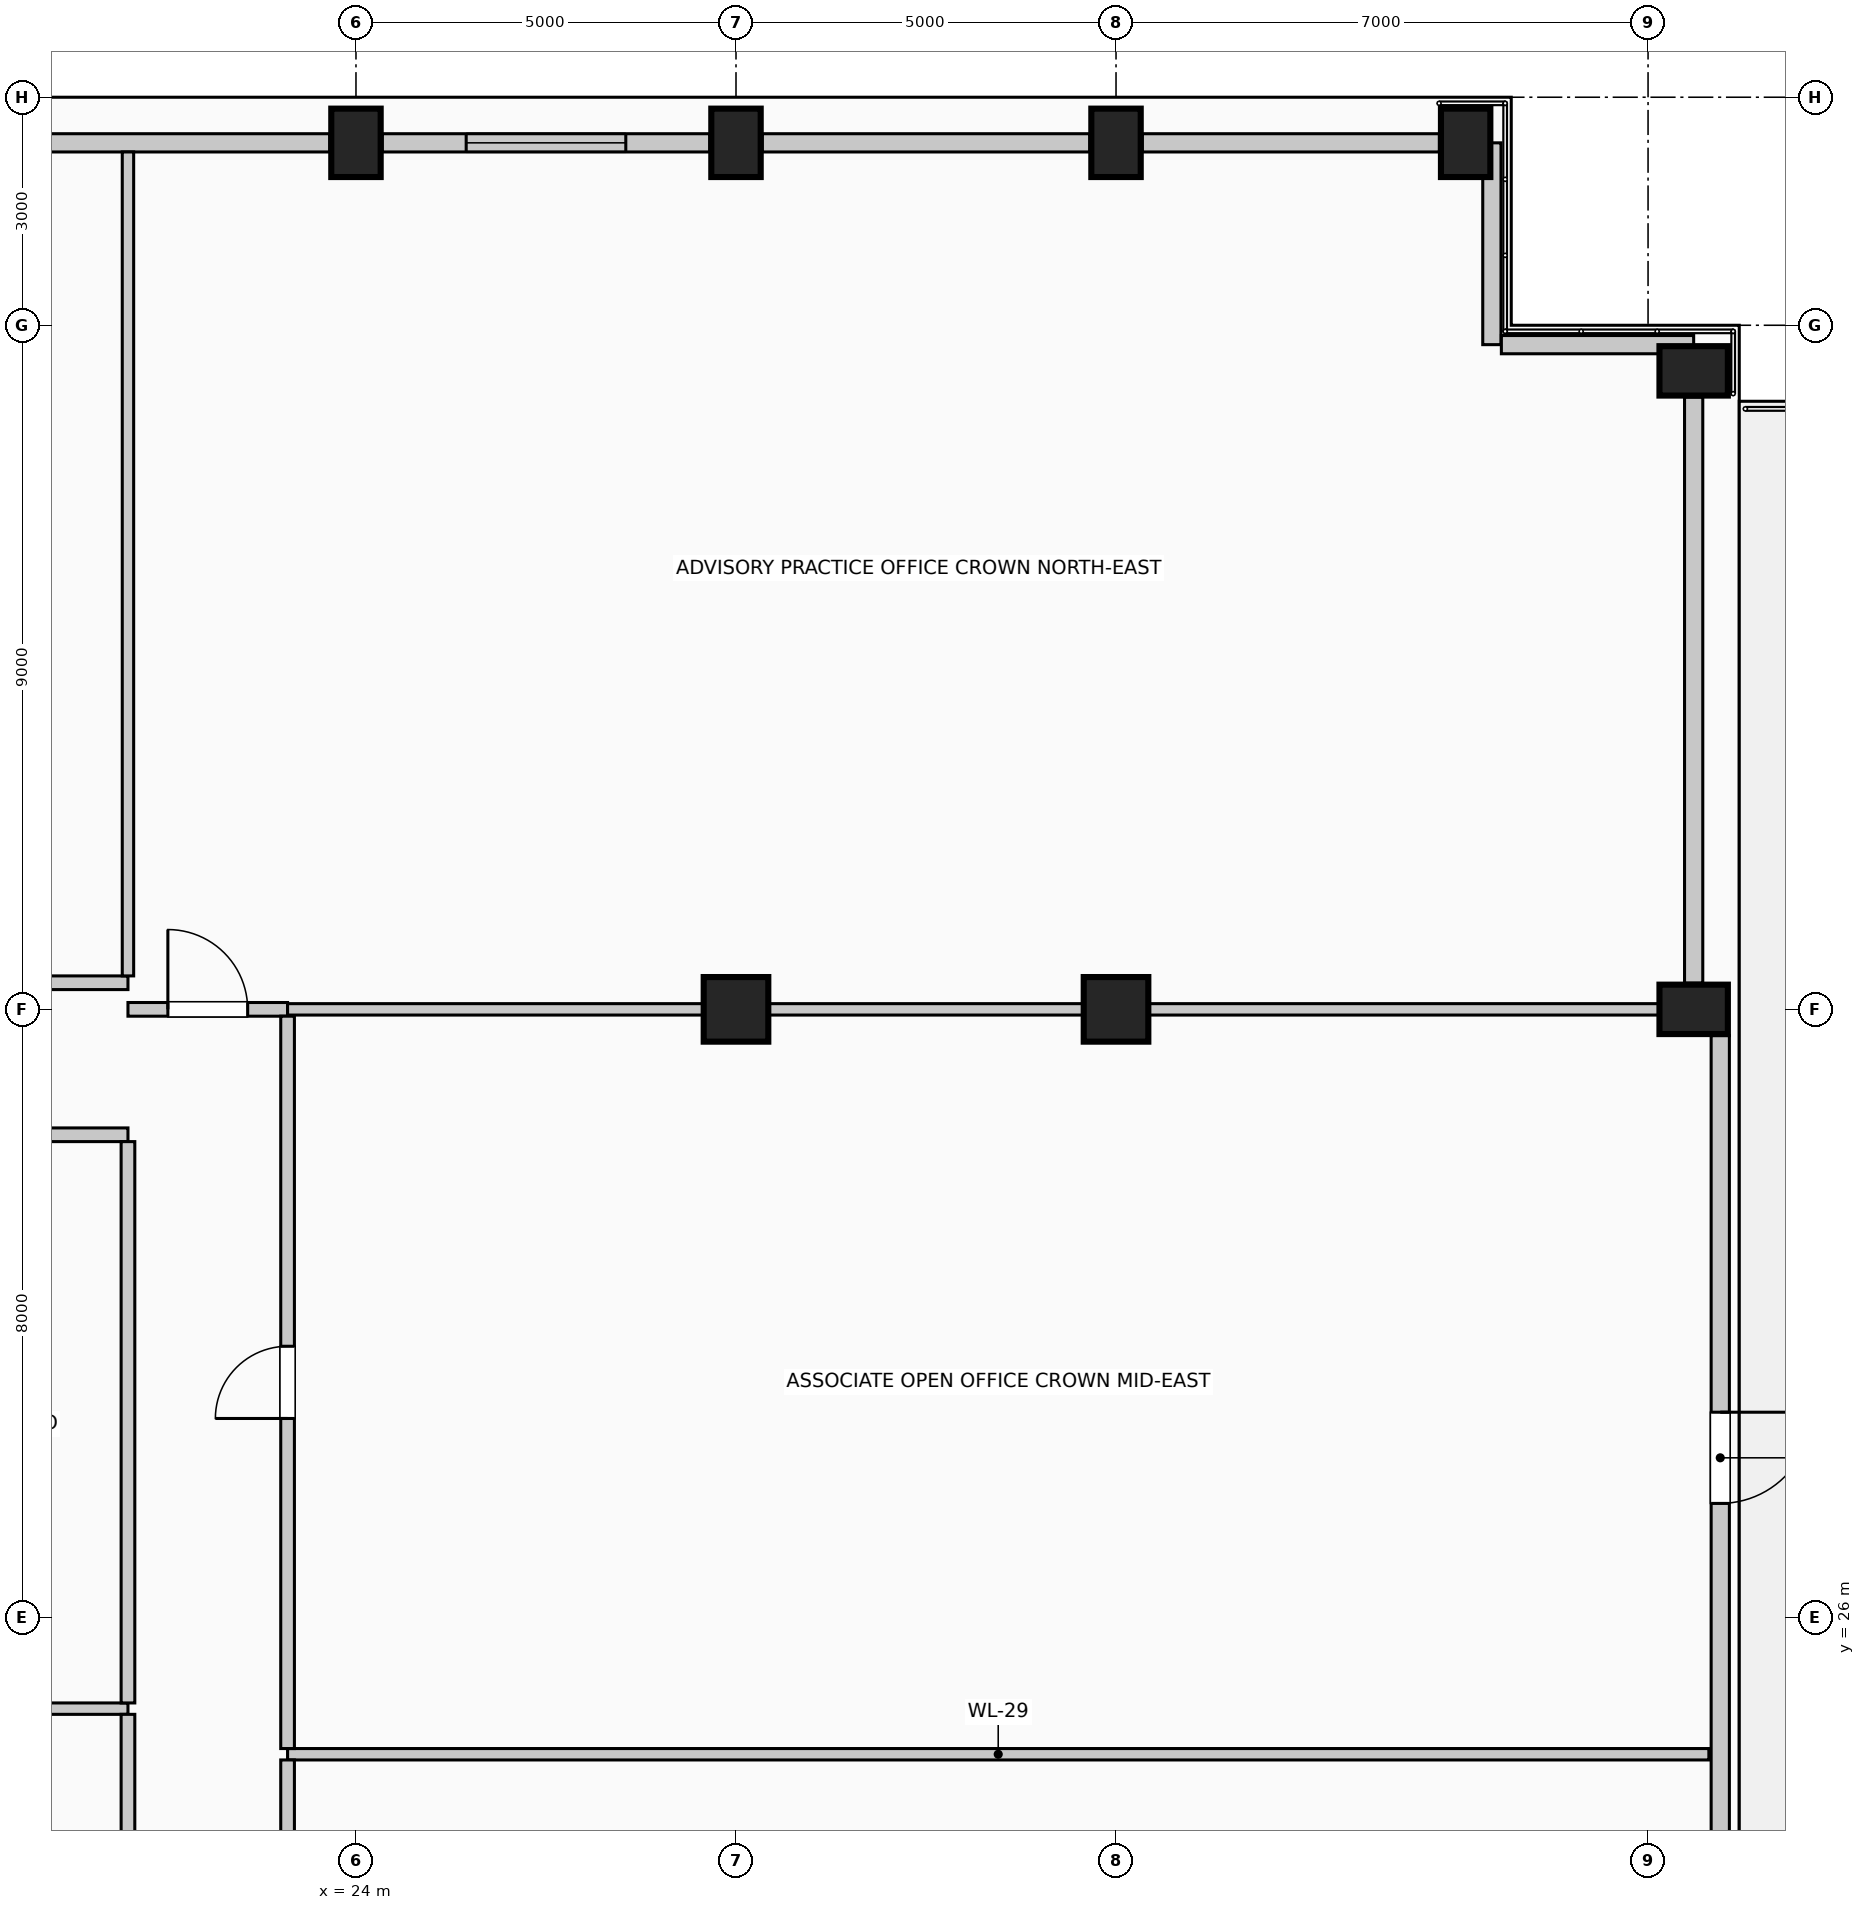
"""IFC4 building model, lengths in metres.
Left out: names, types, materials, properties, quantities, classifications, styles, units other than length and angle.
Written with IfcOpenShell. Run it as: python <this file> out.ifc"""

import sys

from ifc_helpers import new_model, si_unit, direction, frame, frame_2d, origin, origin_2d, place, context, subcontext, project, spatial, rectangle, circle, extrude, element, fill, save


model = new_model("IFC4")
c1 = context("Model", 3, precision=1e-05, world=origin(), true_north=direction((0.0, 1.0)))
c2 = subcontext(c1, "Body", "Model", "MODEL_VIEW")
j1 = project(units=[si_unit("LENGTHUNIT", "METRE"), si_unit("PLANEANGLEUNIT", "RADIAN")], contexts=[c1])
p1 = place(None, origin())
s1 = spatial("IfcSite", under=j1, at=p1, CompositionType="ELEMENT")
p2 = place(p1, origin())
s2 = spatial("IfcBuilding", under=s1, at=p2, CompositionType="ELEMENT")
p3 = place(p2, frame((0.0, 0.0, 297.0)))
s3 = spatial("IfcBuildingStorey", under=s2, at=p3, CompositionType="ELEMENT", Elevation=297.0)
for number, where, z_axis, x_axis in (
    (1, (24.0, 45.4, 0.0), (0.0, 0.0, 1.0), (1.0, 0.0, 0.0)),
    (2, (29.0, 45.4, 0.0), (0.0, 0.0, 1.0), (1.0, 0.0, 0.0)),
    (3, (34.0, 45.4, 0.0), (0.0, 0.0, 1.0), (1.0, 0.0, 0.0)),
    (4, (38.6, 45.4, 0.0), (0.0, 0.0, 1.0), (1.0, 0.0, 0.0)),
    (5, (41.6, 34.0, 0.0), (0.0, 0.0, 1.0), (0.0, 1.0, 0.0)),
    (6, (41.6, 42.4, 0.0), (0.0, 0.0, 1.0), (0.0, 1.0, 0.0)),
):
    element("IfcColumn", number, at=place(p3, frame(where, z_axis=z_axis, x_axis=x_axis)), inside=s3, PredefinedType="COLUMN", context=c2, shape_type="SweptSolid", body=[
        extrude(rectangle(XDim=0.65, YDim=0.9, at=origin_2d()), origin(), (0.0, 0.0, 1.0), 4.0),
    ])
for number, where, z_axis, x_axis in (
    (7, (29.0, 34.0, 0.0), (0.0, 0.0, 1.0), (1.0, 0.0, 0.0)),
    (8, (34.0, 34.0, 0.0), (0.0, 0.0, 1.0), (1.0, 0.0, 0.0)),
):
    element("IfcColumn", number, at=place(p3, frame(where, z_axis=z_axis, x_axis=x_axis)), inside=s3, PredefinedType="COLUMN", context=c2, shape_type="SweptSolid", body=[
        extrude(circle(Radius=0.425, at=origin_2d()), origin(), (0.0, 0.0, 1.0), 4.0),
    ])
p4 = place(p3, frame((16.745, 45.4, 0.0), z_axis=(0.0, 0.0, 1.0), x_axis=(1.0, 0.0, 0.0)))
e9 = element("IfcWall", 9, at=p4, inside=s3, PredefinedType="SOLIDWALL", context=c2, shape_type="SweptSolid", body=[
    extrude(rectangle(XDim=6.91, YDim=0.24, at=frame_2d((3.455, 0.0))), origin(), (0.0, 0.0, 1.0), 3.025),
])
p5 = place(p4, frame((0.903, 0.0, 0.35)))
e10 = element("IfcOpeningElement", 10, at=p5, cuts=e9, PredefinedType="OPENING", context=c2, shape_type="SweptSolid", body=[
    extrude(rectangle(XDim=2.1, YDim=2.2, at=frame_2d((1.05, 1.1))), frame((0.0, 0.13, 0.0), z_axis=(0.0, -1.0, 0.0), x_axis=(1.0, 0.0, 0.0)), (0.0, 0.0, 1.0), 0.26),
])
p6 = place(p3, frame((24.345, 45.4, 0.0), z_axis=(0.0, 0.0, 1.0), x_axis=(1.0, 0.0, 0.0)))
e11 = element("IfcWall", 11, at=p6, inside=s3, PredefinedType="SOLIDWALL", context=c2, shape_type="SweptSolid", body=[
    extrude(rectangle(XDim=4.31, YDim=0.24, at=frame_2d((2.155, 0.0))), origin(), (0.0, 0.0, 1.0), 3.025),
])
p7 = place(p6, frame((1.105, 0.0, 0.35)))
e12 = element("IfcOpeningElement", 12, at=p7, cuts=e11, PredefinedType="OPENING", context=c2, shape_type="SweptSolid", body=[
    extrude(rectangle(XDim=2.1, YDim=2.2, at=frame_2d((1.05, 1.1))), frame((0.0, 0.13, 0.0), z_axis=(0.0, -1.0, 0.0), x_axis=(1.0, 0.0, 0.0)), (0.0, 0.0, 1.0), 0.26),
])
p8 = place(p3, frame((29.345, 45.4, 0.0), z_axis=(0.0, 0.0, 1.0), x_axis=(1.0, 0.0, 0.0)))
e13 = element("IfcWall", 13, at=p8, inside=s3, PredefinedType="SOLIDWALL", context=c2, shape_type="SweptSolid", body=[
    extrude(rectangle(XDim=4.31, YDim=0.24, at=frame_2d((2.155, 0.0))), origin(), (0.0, 0.0, 1.0), 3.025),
])
p9 = place(p3, frame((34.345, 45.4, 0.0), z_axis=(0.0, 0.0, 1.0), x_axis=(1.0, 0.0, 0.0)))
e14 = element("IfcWall", 14, at=p9, inside=s3, PredefinedType="SOLIDWALL", context=c2, shape_type="SweptSolid", body=[
    extrude(rectangle(XDim=3.91, YDim=0.24, at=frame_2d((1.955, 0.0))), origin(), (0.0, 0.0, 1.0), 3.025),
])
p10 = place(p3, frame((41.95, 33.655, 0.0), z_axis=(0.0, 0.0, 1.0), x_axis=(0.0, -1.0, 0.0)))
e15 = element("IfcWall", 15, at=p10, inside=s3, PredefinedType="SOLIDWALL", context=c2, shape_type="SweptSolid", body=[
    extrude(rectangle(XDim=15.31, YDim=0.24, at=frame_2d((7.655, 0.0))), origin(), (0.0, 0.0, 1.0), 3.775),
])
p11 = place(p10, frame((4.955, 0.0, 0.0)))
e16 = element("IfcOpeningElement", 16, at=p11, cuts=e15, PredefinedType="OPENING", context=c2, shape_type="SweptSolid", body=[
    extrude(rectangle(XDim=1.2, YDim=2.25, at=frame_2d((0.6, 1.125))), frame((0.0, 0.13, 0.0), z_axis=(0.0, -1.0, 0.0), x_axis=(1.0, 0.0, 0.0)), (0.0, 0.0, 1.0), 0.26),
])
p12 = place(p3, frame((41.6, 42.055, 0.0), z_axis=(0.0, 0.0, 1.0), x_axis=(0.0, -1.0, 0.0)))
e17 = element("IfcWall", 17, at=p12, inside=s3, PredefinedType="SOLIDWALL", context=c2, shape_type="SweptSolid", body=[
    extrude(rectangle(XDim=7.71, YDim=0.24, at=frame_2d((3.855, 0.0))), origin(), (0.0, 0.0, 1.0), 3.025),
])
p13 = place(p3, frame((38.945, 45.4, 0.0), z_axis=(0.0, 0.0, 1.0), x_axis=(0.0, -1.0, 0.0)))
e18 = element("IfcWall", 18, at=p13, inside=s3, PredefinedType="SOLIDWALL", context=c2, shape_type="SweptSolid", body=[
    extrude(rectangle(XDim=2.655, YDim=0.24, at=frame_2d((1.327, 0.0))), origin(), (0.0, 0.0, 1.0), 3.775),
])
p14 = place(p3, frame((39.07, 42.745, 0.0), z_axis=(0.0, 0.0, 1.0), x_axis=(1.0, 0.0, 0.0)))
e19 = element("IfcWall", 19, at=p14, inside=s3, PredefinedType="SOLIDWALL", context=c2, shape_type="SweptSolid", body=[
    extrude(rectangle(XDim=2.53, YDim=0.24, at=frame_2d((1.265, 0.0))), origin(), (0.0, 0.0, 1.0), 3.775),
])
p15 = place(p3, frame((23.1, 24.2, 0.0), z_axis=(0.0, 0.0, 1.0), x_axis=(1.0, 0.0, 0.0)))
e20 = element("IfcWall", 20, at=p15, inside=s3, PredefinedType="PARTITIONING", context=c2, shape_type="SweptSolid", body=[
    extrude(rectangle(XDim=18.7, YDim=0.15, at=frame_2d((9.35, 0.0))), origin(), (0.0, 0.0, 1.0), 3.775),
])
p16 = place(p3, frame((15.85, 24.8, 0.0), z_axis=(0.0, 0.0, 1.0), x_axis=(1.0, 0.0, 0.0)))
e21 = element("IfcWall", 21, at=p16, inside=s3, PredefinedType="PARTITIONING", context=c2, shape_type="SweptSolid", body=[
    extrude(rectangle(XDim=5.15, YDim=0.15, at=frame_2d((2.575, 0.0))), origin(), (0.0, 0.0, 1.0), 3.775),
])
p17 = place(p3, frame((15.85, 32.35, 0.0), z_axis=(0.0, 0.0, 1.0), x_axis=(1.0, 0.0, 0.0)))
e22 = element("IfcWall", 22, at=p17, inside=s3, PredefinedType="PARTITIONING", context=c2, shape_type="SweptSolid", body=[
    extrude(rectangle(XDim=5.15, YDim=0.18, at=frame_2d((2.575, 0.0))), origin(), (0.0, 0.0, 1.0), 3.775),
])
p18 = place(p3, frame((21.0, 34.0, 0.0), z_axis=(0.0, 0.0, 1.0), x_axis=(1.0, 0.0, 0.0)))
e23 = element("IfcWall", 23, at=p18, inside=s3, PredefinedType="PARTITIONING", context=c2, shape_type="SweptSolid", body=[
    extrude(rectangle(XDim=2.1, YDim=0.18, at=frame_2d((1.05, 0.0))), origin(), (0.0, 0.0, 1.0), 3.27),
])
p19 = place(p18, frame((0.525, 0.0, 0.0)))
e24 = element("IfcOpeningElement", 24, at=p19, cuts=e23, PredefinedType="OPENING", context=c2, shape_type="SweptSolid", body=[
    extrude(rectangle(XDim=1.05, YDim=2.15, at=frame_2d((0.525, 1.075))), frame((0.0, 0.1, 0.0), z_axis=(0.0, -1.0, 0.0), x_axis=(1.0, 0.0, 0.0)), (0.0, 0.0, 1.0), 0.2),
])
p20 = place(p3, frame((23.1, 34.0, 0.0), z_axis=(0.0, 0.0, 1.0), x_axis=(1.0, 0.0, 0.0)))
e25 = element("IfcWall", 25, at=p20, inside=s3, PredefinedType="PARTITIONING", context=c2, shape_type="SweptSolid", body=[
    extrude(rectangle(XDim=5.475, YDim=0.15, at=frame_2d((2.737, 0.0))), origin(), (0.0, 0.0, 1.0), 3.27),
])
p21 = place(p3, frame((29.425, 34.0, 0.0), z_axis=(0.0, 0.0, 1.0), x_axis=(1.0, 0.0, 0.0)))
e26 = element("IfcWall", 26, at=p21, inside=s3, PredefinedType="PARTITIONING", context=c2, shape_type="SweptSolid", body=[
    extrude(rectangle(XDim=4.15, YDim=0.15, at=frame_2d((2.075, 0.0))), origin(), (0.0, 0.0, 1.0), 3.27),
])
p22 = place(p3, frame((34.425, 34.0, 0.0), z_axis=(0.0, 0.0, 1.0), x_axis=(1.0, 0.0, 0.0)))
e27 = element("IfcWall", 27, at=p22, inside=s3, PredefinedType="PARTITIONING", context=c2, shape_type="SweptSolid", body=[
    extrude(rectangle(XDim=6.725, YDim=0.15, at=frame_2d((3.362, 0.0))), origin(), (0.0, 0.0, 1.0), 3.27),
])
p23 = place(p3, frame((17.0, 34.35, 0.0), z_axis=(0.0, 0.0, 1.0), x_axis=(1.0, 0.0, 0.0)))
e28 = element("IfcWall", 28, at=p23, inside=s3, PredefinedType="PARTITIONING", context=c2, shape_type="SweptSolid", body=[
    extrude(rectangle(XDim=4.0, YDim=0.18, at=frame_2d((2.0, 0.0))), origin(), (0.0, 0.0, 1.0), 3.775),
])
p24 = place(p23, frame((1.56, 0.0, 0.0)))
e29 = element("IfcOpeningElement", 29, at=p24, cuts=e28, PredefinedType="OPENING", context=c2, shape_type="SweptSolid", body=[
    extrude(rectangle(XDim=0.88, YDim=2.1, at=frame_2d((0.44, 1.05))), frame((0.0, 0.1, 0.0), z_axis=(0.0, -1.0, 0.0), x_axis=(1.0, 0.0, 0.0)), (0.0, 0.0, 1.0), 0.2),
])
p25 = place(p3, frame((21.0, 17.39, 0.0), z_axis=(0.0, 0.0, 1.0), x_axis=(0.0, 1.0, 0.0)))
e30 = element("IfcWall", 30, at=p25, inside=s3, PredefinedType="PARTITIONING", context=c2, shape_type="SweptSolid", body=[
    extrude(rectangle(XDim=7.335, YDim=0.18, at=frame_2d((3.667, 0.0))), origin(), (0.0, 0.0, 1.0), 3.775),
])
p26 = place(p3, frame((21.0, 24.875, 0.0), z_axis=(0.0, 0.0, 1.0), x_axis=(0.0, 1.0, 0.0)))
e31 = element("IfcWall", 31, at=p26, inside=s3, PredefinedType="PARTITIONING", context=c2, shape_type="SweptSolid", body=[
    extrude(rectangle(XDim=7.385, YDim=0.18, at=frame_2d((3.692, 0.0))), origin(), (0.0, 0.0, 1.0), 3.775),
])
p27 = place(p3, frame((21.0, 34.44, 0.0), z_axis=(0.0, 0.0, 1.0), x_axis=(0.0, 1.0, 0.0)))
e32 = element("IfcWall", 32, at=p27, inside=s3, PredefinedType="PARTITIONING", context=c2, shape_type="SweptSolid", body=[
    extrude(rectangle(XDim=10.84, YDim=0.15, at=frame_2d((5.42, 0.0))), origin(), (0.0, 0.0, 1.0), 3.775),
])
p28 = place(p3, frame((23.1, 17.39, 0.0), z_axis=(0.0, 0.0, 1.0), x_axis=(0.0, 1.0, 0.0)))
e33 = element("IfcWall", 33, at=p28, inside=s3, PredefinedType="PARTITIONING", context=c2, shape_type="SweptSolid", body=[
    extrude(rectangle(XDim=6.735, YDim=0.18, at=frame_2d((3.368, 0.0))), origin(), (0.0, 0.0, 1.0), 3.775),
])
p29 = place(p3, frame((23.1, 24.275, 0.0), z_axis=(0.0, 0.0, 1.0), x_axis=(0.0, 1.0, 0.0)))
e34 = element("IfcWall", 34, at=p29, inside=s3, PredefinedType="PARTITIONING", context=c2, shape_type="SweptSolid", body=[
    extrude(rectangle(XDim=9.635, YDim=0.18, at=frame_2d((4.817, 0.0))), origin(), (0.0, 0.0, 1.0), 3.775),
])
p30 = place(p29, frame((4.343, 0.0, 0.0)))
e35 = element("IfcOpeningElement", 35, at=p30, cuts=e34, PredefinedType="OPENING", context=c2, shape_type="SweptSolid", body=[
    extrude(rectangle(XDim=0.95, YDim=2.15, at=frame_2d((0.475, 1.075))), frame((0.0, 0.1, 0.0), z_axis=(0.0, -1.0, 0.0), x_axis=(1.0, 0.0, 0.0)), (0.0, 0.0, 1.0), 0.2),
])
p31 = place(p7, origin())
e36 = element("IfcWindow", 36, at=p31, inside=s3, PartitioningType="SINGLE_PANEL", PredefinedType="WINDOW", context=c2, shape_type="SweptSolid", body=[
    extrude(rectangle(XDim=2.1, YDim=2.2, at=frame_2d((1.05, 1.1))), frame((0.0, 0.03, 0.0), z_axis=(0.0, -1.0, 0.0), x_axis=(1.0, 0.0, 0.0)), (0.0, 0.0, 1.0), 0.06),
])
fill(e12, e36)
p32 = place(p11, origin())
e37 = element("IfcDoor", 37, at=p32, inside=s3, OperationType="SINGLE_SWING_LEFT", PredefinedType="DOOR", context=c2, shape_type="SweptSolid", body=[
    extrude(rectangle(XDim=1.2, YDim=2.25, at=frame_2d((0.6, 1.125))), frame((0.0, 0.025, 0.0), z_axis=(0.0, -1.0, 0.0), x_axis=(1.0, 0.0, 0.0)), (0.0, 0.0, 1.0), 0.05),
])
fill(e16, e37)
p33 = place(p19, origin())
e38 = element("IfcDoor", 38, at=p33, inside=s3, OperationType="SINGLE_SWING_LEFT", PredefinedType="DOOR", context=c2, shape_type="SweptSolid", body=[
    extrude(rectangle(XDim=1.05, YDim=2.15, at=frame_2d((0.525, 1.075))), frame((0.0, 0.025, 0.0), z_axis=(0.0, -1.0, 0.0), x_axis=(1.0, 0.0, 0.0)), (0.0, 0.0, 1.0), 0.05),
])
fill(e24, e38)
p34 = place(p30, origin())
e39 = element("IfcDoor", 39, at=p34, inside=s3, OperationType="SINGLE_SWING_LEFT", PredefinedType="DOOR", context=c2, shape_type="SweptSolid", body=[
    extrude(rectangle(XDim=0.95, YDim=2.15, at=frame_2d((0.475, 1.075))), frame((0.0, 0.025, 0.0), z_axis=(0.0, -1.0, 0.0), x_axis=(1.0, 0.0, 0.0)), (0.0, 0.0, 1.0), 0.05),
])
fill(e35, e39)
save(model, sys.argv[1])
